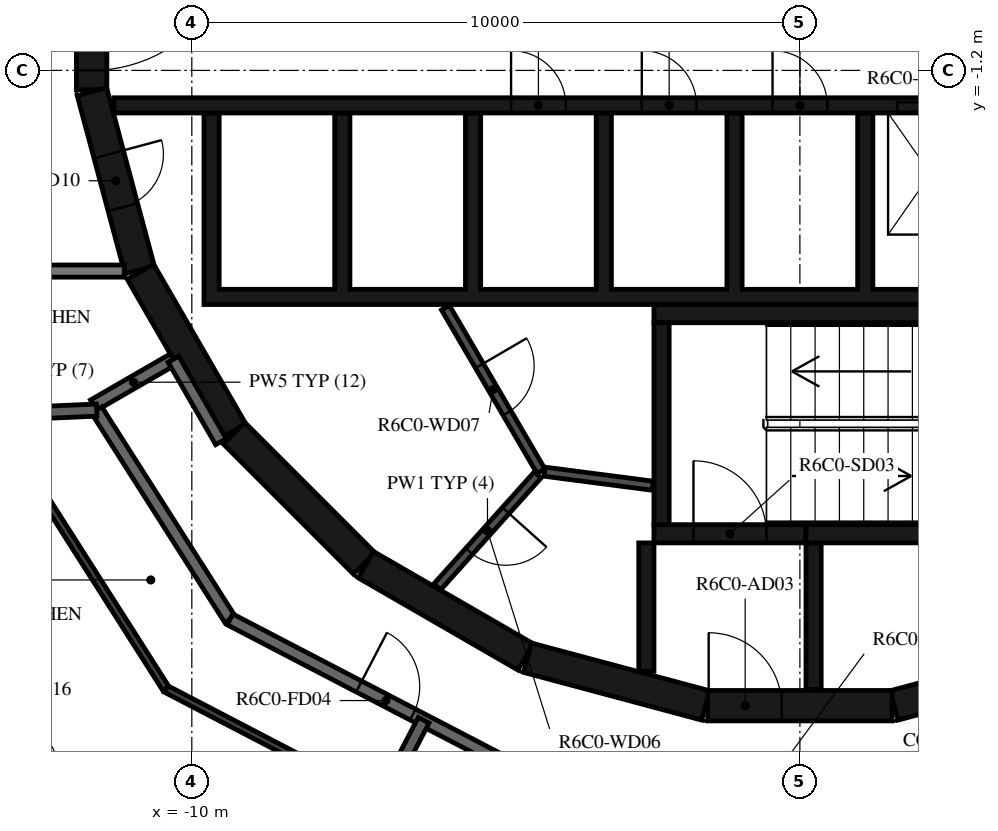
"""IFC4 building model, lengths in metres.
Left out: names, types, materials, properties, quantities, classifications, styles, units other than length and angle.
Written with IfcOpenShell. Run it as: python <this file> out.ifc"""

import sys

from ifc_helpers import new_model, si_unit, direction, frame, frame_2d, origin, place, context, subcontext, project, spatial, polyline, rectangle, outline, extrude, element, fill, save


model = new_model("IFC4")
c1 = context("Model", 3, precision=1e-05, world=origin(), true_north=direction((0.0, 1.0)))
c2 = subcontext(c1, "Body", "Model", "MODEL_VIEW")
j1 = project(units=[si_unit("LENGTHUNIT", "METRE"), si_unit("PLANEANGLEUNIT", "RADIAN")], contexts=[c1])
p1 = place(None, origin())
s1 = spatial("IfcSite", under=j1, at=p1, CompositionType="ELEMENT")
p2 = place(p1, origin())
s2 = spatial("IfcBuilding", under=s1, at=p2, CompositionType="ELEMENT")
p3 = place(p2, frame((0.0, 0.0, 247.7)))
s3 = spatial("IfcBuildingStorey", under=s2, at=p3, CompositionType="ELEMENT", Elevation=247.7)
p4 = place(p3, frame((1.55, -11.643, 0.0), z_axis=(0.0, 0.0, 1.0), x_axis=(0.965948410781, 0.258734743916, 0.0)))
e1 = element("IfcWall", 1, at=p4, inside=s3, PredefinedType="SHEAR", context=c2, shape_type="SweptSolid", body=[
    extrude(rectangle(XDim=3.033, YDim=0.5, at=frame_2d((1.516, 0.0))), origin(), (0.0, 0.0, 1.0), 3.12),
])
p5 = place(p3, frame((-11.647, 1.516, 0.0), z_axis=(0.0, 0.0, 1.0), x_axis=(0.0, -1.0, 0.0)))
e2 = element("IfcWall", 2, at=p5, inside=s3, PredefinedType="SHEAR", context=c2, shape_type="SweptSolid", body=[
    extrude(rectangle(XDim=3.033, YDim=0.5, at=frame_2d((1.516, 0.0))), origin(), (0.0, 0.0, 1.0), 3.12),
])
p6 = place(p5, frame((0.316, 0.0, 0.0)))
e3 = element("IfcOpeningElement", 3, at=p6, cuts=e2, PredefinedType="OPENING", context=c2, shape_type="SweptSolid", body=[
    extrude(rectangle(XDim=2.4, YDim=2.1, at=frame_2d((1.2, 1.05))), frame((0.0, 0.26, 0.0), z_axis=(0.0, -1.0, 0.0), x_axis=(1.0, 0.0, 0.0)), (0.0, 0.0, 1.0), 0.52),
])
p7 = place(p3, frame((-11.643, -1.55, 0.0), z_axis=(0.0, 0.0, 1.0), x_axis=(0.258734743916, -0.965948410781, 0.0)))
e4 = element("IfcWall", 4, at=p7, inside=s3, PredefinedType="SHEAR", context=c2, shape_type="SweptSolid", body=[
    extrude(rectangle(XDim=3.033, YDim=0.5, at=frame_2d((1.516, 0.0))), origin(), (0.0, 0.0, 1.0), 3.12),
])
p8 = place(p7, frame((1.066, 0.0, 0.0)))
e5 = element("IfcOpeningElement", 5, at=p8, cuts=e4, PredefinedType="OPENING", context=c2, shape_type="SweptSolid", body=[
    extrude(rectangle(XDim=0.9, YDim=2.1, at=frame_2d((0.45, 1.05))), frame((0.0, 0.26, 0.0), z_axis=(0.0, -1.0, 0.0), x_axis=(1.0, 0.0, 0.0)), (0.0, 0.0, 1.0), 0.52),
])
p9 = place(p3, frame((-10.845, -4.51, 0.0), z_axis=(0.0, 0.0, 1.0), x_axis=(0.500087131594, -0.865975092491, 0.0)))
e6 = element("IfcWall", 6, at=p9, inside=s3, PredefinedType="SHEAR", context=c2, shape_type="SweptSolid", body=[
    extrude(rectangle(XDim=3.033, YDim=0.5, at=frame_2d((1.516, 0.0))), origin(), (0.0, 0.0, 1.0), 3.12),
])
p10 = place(p3, frame((-9.308, -7.164, 0.0), z_axis=(0.0, 0.0, 1.0), x_axis=(0.707106781187, -0.707106781187, 0.0)))
e7 = element("IfcWall", 7, at=p10, inside=s3, PredefinedType="SHEAR", context=c2, shape_type="SweptSolid", body=[
    extrude(rectangle(XDim=3.032, YDim=0.5, at=frame_2d((1.516, 0.0))), origin(), (0.0, 0.0, 1.0), 3.12),
])
for number, where, z_axis, x_axis in (
    (8, (-7.137, -9.329, 0.0), (0.0, 0.0, 1.0), (0.866, -0.5, 0.0)),
    (9, (-4.479, -10.858, 0.0), (0.0, 0.0, 1.0), (0.966, -0.259, 0.0)),
):
    element("IfcWall", number, at=place(p3, frame(where, z_axis=z_axis, x_axis=x_axis)), inside=s3, PredefinedType="SHEAR", context=c2, shape_type="SweptSolid", body=[
        extrude(rectangle(XDim=3.033, YDim=0.5, at=frame_2d((1.516, 0.0))), origin(), (0.0, 0.0, 1.0), 3.12),
    ])
p11 = place(p3, frame((-1.516, -11.647, 0.0), z_axis=(0.0, 0.0, 1.0), x_axis=(1.0, 0.0, 0.0)))
e10 = element("IfcWall", 10, at=p11, inside=s3, PredefinedType="SHEAR", context=c2, shape_type="SweptSolid", body=[
    extrude(rectangle(XDim=3.033, YDim=0.5, at=frame_2d((1.516, 0.0))), origin(), (0.0, 0.0, 1.0), 3.12),
])
p12 = place(p11, frame((0.016, 0.0, 0.0)))
e11 = element("IfcOpeningElement", 11, at=p12, cuts=e10, PredefinedType="OPENING", context=c2, shape_type="SweptSolid", body=[
    extrude(rectangle(XDim=1.2, YDim=2.1, at=frame_2d((0.6, 1.05))), frame((0.0, 0.26, 0.0), z_axis=(0.0, -1.0, 0.0), x_axis=(1.0, 0.0, 0.0)), (0.0, 0.0, 1.0), 0.52),
])
p13 = place(p3, frame((-2.275, -8.67, 0.0), z_axis=(0.0, 0.0, 1.0), x_axis=(0.0, 1.0, 0.0)))
e12 = element("IfcWall", 12, at=p13, inside=s3, PredefinedType="SHEAR", context=c2, shape_type="SweptSolid", body=[
    extrude(rectangle(XDim=3.32, YDim=0.25, at=frame_2d((1.66, 0.0))), origin(), (0.0, 0.0, 1.0), 3.12),
])
p14 = place(p3, frame((-2.4, -5.2, 0.0), z_axis=(0.0, 0.0, 1.0), x_axis=(1.0, 0.0, 0.0)))
e13 = element("IfcWall", 13, at=p14, inside=s3, PredefinedType="SHEAR", context=c2, shape_type="SweptSolid", body=[
    extrude(rectangle(XDim=7.05, YDim=0.3, at=frame_2d((3.525, 0.0))), origin(), (0.0, 0.0, 1.0), 3.12),
])
p15 = place(p3, frame((0.1, -8.82, 0.0), z_axis=(0.0, 0.0, 1.0), x_axis=(1.0, 0.0, 0.0)))
e14 = element("IfcWall", 14, at=p15, inside=s3, PredefinedType="SHEAR", context=c2, shape_type="SweptSolid", body=[
    extrude(rectangle(XDim=4.55, YDim=0.3, at=frame_2d((2.275, 0.0))), origin(), (0.0, 0.0, 1.0), 3.12),
])
p16 = place(p3, frame((-2.4, -8.82, 0.0), z_axis=(0.0, 0.0, 1.0), x_axis=(1.0, 0.0, 0.0)))
e15 = element("IfcWall", 15, at=p16, inside=s3, PredefinedType="SHEAR", context=c2, shape_type="SweptSolid", body=[
    extrude(rectangle(XDim=2.5, YDim=0.3, at=frame_2d((1.25, 0.0))), origin(), (0.0, 0.0, 1.0), 3.12),
])
p17 = place(p16, frame((0.65, 0.0, 0.0)))
e16 = element("IfcOpeningElement", 16, at=p17, cuts=e15, PredefinedType="OPENING", context=c2, shape_type="SweptSolid", body=[
    extrude(rectangle(XDim=1.2, YDim=2.1, at=frame_2d((0.6, 1.05))), frame((0.0, 0.16, 0.0), z_axis=(0.0, -1.0, 0.0), x_axis=(1.0, 0.0, 0.0)), (0.0, 0.0, 1.0), 0.32),
])
p18 = place(p3, frame((-2.525, -8.97, 0.0), z_axis=(0.0, 0.0, 1.0), x_axis=(0.0, -1.0, 0.0)))
e17 = element("IfcWall", 17, at=p18, inside=s3, PredefinedType="SHEAR", context=c2, shape_type="SweptSolid", body=[
    extrude(rectangle(XDim=2.11, YDim=0.25, at=frame_2d((1.055, 0.0))), origin(), (0.0, 0.0, 1.0), 3.12),
])
p19 = place(p3, frame((0.225, -8.97, 0.0), z_axis=(0.0, 0.0, 1.0), x_axis=(0.0, -1.0, 0.0)))
e18 = element("IfcWall", 18, at=p19, inside=s3, PredefinedType="SHEAR", context=c2, shape_type="SweptSolid", body=[
    extrude(rectangle(XDim=2.41, YDim=0.25, at=frame_2d((1.205, 0.0))), origin(), (0.0, 0.0, 1.0), 3.12),
])
p20 = place(p3, origin())
e19 = element("IfcWall", 19, at=p20, inside=s3, PredefinedType="SHEAR", context=c2, shape_type="SweptSolid", body=[
    extrude(outline(polyline([(9.8, -5.05), (9.8, -4.8), (9.8, -1.9), (9.55, -1.9), (9.55, -4.8), (7.65, -4.8), (7.65, -1.9), (7.4, -1.9), (7.4, -4.8), (5.5, -4.8), (5.5, -1.9), (5.25, -1.9), (5.25, -4.8), (3.35, -4.8), (3.35, -1.9), (3.1, -1.9), (3.1, -4.8), (1.2, -4.8), (1.2, -1.9), (0.95, -1.9), (0.95, -4.8), (-0.95, -4.8), (-0.95, -1.9), (-1.2, -1.9), (-1.2, -4.8), (-3.1, -4.8), (-3.1, -1.9), (-3.35, -1.9), (-3.35, -4.8), (-5.25, -4.8), (-5.25, -1.9), (-5.5, -1.9), (-5.5, -4.8), (-7.4, -4.8), (-7.4, -1.9), (-7.65, -1.9), (-7.65, -4.8), (-9.55, -4.8), (-9.55, -1.9), (-9.8, -1.9), (-9.8, -4.8), (-9.8, -5.05), (9.8, -5.05)])), origin(), (0.0, 0.0, 1.0), 3.12),
])
p21 = place(p3, frame((-11.28, -1.775, 0.0), z_axis=(0.0, 0.0, 1.0), x_axis=(1.0, 0.0, 0.0)))
e20 = element("IfcWall", 20, at=p21, inside=s3, PredefinedType="SHEAR", context=c2, shape_type="SweptSolid", body=[
    extrude(rectangle(XDim=14.38, YDim=0.25, at=frame_2d((7.19, 0.0))), origin(), (0.0, 0.0, 1.0), 3.12),
])
p22 = place(p21, frame((12.88, 0.0, 0.0)))
e21 = element("IfcOpeningElement", 21, at=p22, cuts=e20, PredefinedType="OPENING", context=c2, shape_type="SweptSolid", body=[
    extrude(rectangle(XDim=1.1, YDim=2.1, at=frame_2d((0.55, 1.05))), frame((0.0, 0.135, 0.0), z_axis=(0.0, -1.0, 0.0), x_axis=(1.0, 0.0, 0.0)), (0.0, 0.0, 1.0), 0.27),
])
p23 = place(p21, frame((6.53, 0.0, 0.0)))
e22 = element("IfcOpeningElement", 22, at=p23, cuts=e20, PredefinedType="OPENING", context=c2, shape_type="SweptSolid", body=[
    extrude(rectangle(XDim=0.9, YDim=2.1, at=frame_2d((0.45, 1.05))), frame((0.0, 0.135, 0.0), z_axis=(0.0, -1.0, 0.0), x_axis=(1.0, 0.0, 0.0)), (0.0, 0.0, 1.0), 0.27),
])
p24 = place(p21, frame((8.68, 0.0, 0.0)))
e23 = element("IfcOpeningElement", 23, at=p24, cuts=e20, PredefinedType="OPENING", context=c2, shape_type="SweptSolid", body=[
    extrude(rectangle(XDim=0.9, YDim=2.1, at=frame_2d((0.45, 1.05))), frame((0.0, 0.135, 0.0), z_axis=(0.0, -1.0, 0.0), x_axis=(1.0, 0.0, 0.0)), (0.0, 0.0, 1.0), 0.27),
])
p25 = place(p21, frame((10.83, 0.0, 0.0)))
e24 = element("IfcOpeningElement", 24, at=p25, cuts=e20, PredefinedType="OPENING", context=c2, shape_type="SweptSolid", body=[
    extrude(rectangle(XDim=0.9, YDim=2.1, at=frame_2d((0.45, 1.05))), frame((0.0, 0.135, 0.0), z_axis=(0.0, -1.0, 0.0), x_axis=(1.0, 0.0, 0.0)), (0.0, 0.0, 1.0), 0.27),
])
p26 = place(p3, frame((-5.829, -5.102, 0.0), z_axis=(0.0, 0.0, 1.0), x_axis=(0.504480008384, -0.863423373057, 0.0)))
e25 = element("IfcWall", 25, at=p26, inside=s3, PredefinedType="PARTITIONING", context=c2, shape_type="SweptSolid", body=[
    extrude(rectangle(XDim=3.115, YDim=0.15, at=frame_2d((1.558, 0.0))), origin(), (0.0, 0.0, 1.0), 3.12),
])
p27 = place(p26, frame((1.107, 0.0, 0.0)))
e26 = element("IfcOpeningElement", 26, at=p27, cuts=e25, PredefinedType="OPENING", context=c2, shape_type="SweptSolid", body=[
    extrude(rectangle(XDim=0.9, YDim=2.1, at=frame_2d((0.45, 1.05))), frame((0.0, 0.085, 0.0), z_axis=(0.0, -1.0, 0.0), x_axis=(1.0, 0.0, 0.0)), (0.0, 0.0, 1.0), 0.17),
])
p28 = place(p3, frame((-4.311, -7.851, 0.0), z_axis=(0.0, 0.0, 1.0), x_axis=(-0.667869133096, -0.744278725383, 0.0)))
e27 = element("IfcWall", 27, at=p28, inside=s3, PredefinedType="PARTITIONING", context=c2, shape_type="SweptSolid", body=[
    extrude(rectangle(XDim=2.476, YDim=0.15, at=frame_2d((1.238, 0.0))), origin(), (0.0, 0.0, 1.0), 3.12),
])
p29 = place(p28, frame((0.788, 0.0, 0.0)))
e28 = element("IfcOpeningElement", 28, at=p29, cuts=e27, PredefinedType="OPENING", context=c2, shape_type="SweptSolid", body=[
    extrude(rectangle(XDim=0.9, YDim=2.1, at=frame_2d((0.45, 1.05))), frame((0.0, 0.085, 0.0), z_axis=(0.0, -1.0, 0.0), x_axis=(1.0, 0.0, 0.0)), (0.0, 0.0, 1.0), 0.17),
])
p30 = place(p3, frame((-4.198, -7.799, 0.0), z_axis=(0.0, 0.0, 1.0), x_axis=(0.991686747293, -0.128675542523, 0.0)))
e29 = element("IfcWall", 29, at=p30, inside=s3, PredefinedType="PARTITIONING", context=c2, shape_type="SweptSolid", body=[
    extrude(rectangle(XDim=1.793, YDim=0.15, at=frame_2d((0.896, 0.0))), origin(), (0.0, 0.0, 1.0), 3.12),
])
p31 = place(p3, frame((-10.303, -5.949, 0.0), z_axis=(0.0, 0.0, 1.0), x_axis=(-0.866043382451, -0.499968858743, 0.0)))
e30 = element("IfcWall", 30, at=p31, inside=s3, PredefinedType="STANDARD", context=c2, shape_type="SweptSolid", body=[
    extrude(rectangle(XDim=1.515, YDim=0.2, at=frame_2d((0.758, 0.0))), origin(), (0.0, 0.0, 1.0), 3.12),
])
p32 = place(p3, frame((-9.52, -7.305, 0.0), z_axis=(0.0, 0.0, 1.0), x_axis=(-0.500028278809, 0.866009076391, 0.0)))
e31 = element("IfcWall", 31, at=p32, inside=s3, PredefinedType="STANDARD", context=c2, shape_type="SweptSolid", body=[
    extrude(rectangle(XDim=1.566, YDim=0.2, at=frame_2d((0.783, 0.0))), origin(), (0.0, 0.0, 1.0), 3.12),
])
p33 = place(p3, frame((-11.565, -6.786, 0.0), z_axis=(0.0, 0.0, 1.0), x_axis=(0.537297327359, -0.843392898958, 0.0)))
e32 = element("IfcWall", 32, at=p33, inside=s3, PredefinedType="STANDARD", context=c2, shape_type="SweptSolid", body=[
    extrude(rectangle(XDim=4.081, YDim=0.2, at=frame_2d((2.041, 0.0))), origin(), (0.0, 0.0, 1.0), 3.12),
])
p34 = place(p3, frame((-9.372, -10.228, 0.0), z_axis=(0.0, 0.0, 1.0), x_axis=(0.887005184532, -0.461759464021, 0.0)))
e33 = element("IfcWall", 33, at=p34, inside=s3, PredefinedType="STANDARD", context=c2, shape_type="SweptSolid", body=[
    extrude(rectangle(XDim=7.181, YDim=0.2, at=frame_2d((3.591, 0.0))), origin(), (0.0, 0.0, 1.0), 3.12),
])
p35 = place(p34, frame((2.391, 0.0, 0.0)))
e34 = element("IfcOpeningElement", 34, at=p35, cuts=e33, PredefinedType="OPENING", context=c2, shape_type="SweptSolid", body=[
    extrude(rectangle(XDim=1.0, YDim=2.1, at=frame_2d((0.5, 1.05))), frame((0.0, 0.11, 0.0), z_axis=(0.0, -1.0, 0.0), x_axis=(1.0, 0.0, 0.0)), (0.0, 0.0, 1.0), 0.22),
])
p36 = place(p3, frame((-17.655, -4.5, 0.0), z_axis=(0.0, 0.0, 1.0), x_axis=(1.0, 0.0, 0.0)))
e35 = element("IfcWall", 35, at=p36, inside=s3, PredefinedType="STANDARD", context=c2, shape_type="SweptSolid", body=[
    extrude(rectangle(XDim=6.543, YDim=0.2, at=frame_2d((3.272, 0.0))), origin(), (0.0, 0.0, 1.0), 3.12),
])
p37 = place(p3, frame((-13.414, -6.867, 0.0), z_axis=(0.0, 0.0, 1.0), x_axis=(0.999046427216, 0.043660465726, 0.0)))
e36 = element("IfcWall", 36, at=p37, inside=s3, PredefinedType="STANDARD", context=c2, shape_type="SweptSolid", body=[
    extrude(rectangle(XDim=1.851, YDim=0.2, at=frame_2d((0.925, 0.0))), origin(), (0.0, 0.0, 1.0), 3.12),
])
p38 = place(p3, frame((-7.541, -14.486, 0.0), z_axis=(0.0, 0.0, 1.0), x_axis=(0.461746051786, 0.88701216658, 0.0)))
e37 = element("IfcWall", 37, at=p38, inside=s3, PredefinedType="STANDARD", context=c2, shape_type="SweptSolid", body=[
    extrude(rectangle(XDim=2.931, YDim=0.2, at=frame_2d((1.466, 0.0))), origin(), (0.0, 0.0, 1.0), 3.12),
])
p39 = place(p3, frame((-12.402, -8.265, 0.0), z_axis=(0.0, 0.0, 1.0), x_axis=(0.537321213777, -0.843377681247, 0.0)))
e38 = element("IfcWall", 38, at=p39, inside=s3, PredefinedType="PARTITIONING", context=c2, shape_type="SweptSolid", body=[
    extrude(rectangle(XDim=3.685, YDim=0.12, at=frame_2d((1.843, 0.0))), origin(), (0.0, 0.0, 1.0), 3.12),
])
p40 = place(p3, frame((-10.421, -11.373, 0.0), z_axis=(0.0, 0.0, 1.0), x_axis=(0.887012970857, -0.461744506769, 0.0)))
e39 = element("IfcWall", 39, at=p40, inside=s3, PredefinedType="PARTITIONING", context=c2, shape_type="SweptSolid", body=[
    extrude(rectangle(XDim=7.985, YDim=0.12, at=frame_2d((3.992, 0.0))), origin(), (0.0, 0.0, 1.0), 3.12),
])
p41 = place(p40, frame((4.192, 0.0, 0.0)))
e40 = element("IfcOpeningElement", 40, at=p41, cuts=e39, PredefinedType="OPENING", context=c2, shape_type="SweptSolid", body=[
    extrude(rectangle(XDim=0.9, YDim=2.1, at=frame_2d((0.45, 1.05))), frame((0.0, 0.07, 0.0), z_axis=(0.0, -1.0, 0.0), x_axis=(1.0, 0.0, 0.0)), (0.0, 0.0, 1.0), 0.14),
])
p42 = place(p17, origin())
e41 = element("IfcDoor", 41, at=p42, inside=s3, OperationType="SINGLE_SWING_LEFT", PredefinedType="DOOR", context=c2, shape_type="SweptSolid", body=[
    extrude(rectangle(XDim=1.2, YDim=2.1, at=frame_2d((0.6, 1.05))), frame((0.0, 0.025, 0.0), z_axis=(0.0, -1.0, 0.0), x_axis=(1.0, 0.0, 0.0)), (0.0, 0.0, 1.0), 0.05),
])
fill(e16, e41)
p43 = place(p12, origin())
e42 = element("IfcDoor", 42, at=p43, inside=s3, OperationType="SINGLE_SWING_RIGHT", PredefinedType="DOOR", context=c2, shape_type="SweptSolid", body=[
    extrude(rectangle(XDim=1.2, YDim=2.1, at=frame_2d((0.6, 1.05))), frame((0.0, 0.025, 0.0), z_axis=(0.0, -1.0, 0.0), x_axis=(1.0, 0.0, 0.0)), (0.0, 0.0, 1.0), 0.05),
])
fill(e11, e42)
p44 = place(p6, origin())
e43 = element("IfcDoor", 43, at=p44, inside=s3, OperationType="DOUBLE_DOOR_SINGLE_SWING", PredefinedType="DOOR", context=c2, shape_type="SweptSolid", body=[
    extrude(rectangle(XDim=2.4, YDim=2.1, at=frame_2d((1.2, 1.05))), frame((0.0, 0.025, 0.0), z_axis=(0.0, -1.0, 0.0), x_axis=(1.0, 0.0, 0.0)), (0.0, 0.0, 1.0), 0.05),
])
fill(e3, e43)
p45 = place(p22, origin())
e44 = element("IfcDoor", 44, at=p45, inside=s3, OperationType="DOUBLE_DOOR_SLIDING", PredefinedType="DOOR", context=c2, shape_type="SweptSolid", body=[
    extrude(rectangle(XDim=1.1, YDim=2.1, at=frame_2d((0.55, 1.05))), frame((0.0, 0.025, 0.0), z_axis=(0.0, -1.0, 0.0), x_axis=(1.0, 0.0, 0.0)), (0.0, 0.0, 1.0), 0.05),
])
fill(e21, e44)
p46 = place(p23, origin())
e45 = element("IfcDoor", 45, at=p46, inside=s3, OperationType="SINGLE_SWING_LEFT", PredefinedType="DOOR", context=c2, shape_type="SweptSolid", body=[
    extrude(rectangle(XDim=0.9, YDim=2.1, at=frame_2d((0.45, 1.05))), frame((0.0, 0.025, 0.0), z_axis=(0.0, -1.0, 0.0), x_axis=(1.0, 0.0, 0.0)), (0.0, 0.0, 1.0), 0.05),
])
fill(e22, e45)
p47 = place(p24, origin())
e46 = element("IfcDoor", 46, at=p47, inside=s3, OperationType="SINGLE_SWING_RIGHT", PredefinedType="DOOR", context=c2, shape_type="SweptSolid", body=[
    extrude(rectangle(XDim=0.9, YDim=2.1, at=frame_2d((0.45, 1.05))), frame((0.0, 0.025, 0.0), z_axis=(0.0, -1.0, 0.0), x_axis=(1.0, 0.0, 0.0)), (0.0, 0.0, 1.0), 0.05),
])
fill(e23, e46)
p48 = place(p25, origin())
e47 = element("IfcDoor", 47, at=p48, inside=s3, OperationType="SINGLE_SWING_LEFT", PredefinedType="DOOR", context=c2, shape_type="SweptSolid", body=[
    extrude(rectangle(XDim=0.9, YDim=2.1, at=frame_2d((0.45, 1.05))), frame((0.0, 0.025, 0.0), z_axis=(0.0, -1.0, 0.0), x_axis=(1.0, 0.0, 0.0)), (0.0, 0.0, 1.0), 0.05),
])
fill(e24, e47)
p49 = place(p29, origin())
e48 = element("IfcDoor", 48, at=p49, inside=s3, OperationType="SINGLE_SWING_RIGHT", PredefinedType="DOOR", context=c2, shape_type="SweptSolid", body=[
    extrude(rectangle(XDim=0.9, YDim=2.1, at=frame_2d((0.45, 1.05))), frame((0.0, 0.025, 0.0), z_axis=(0.0, -1.0, 0.0), x_axis=(1.0, 0.0, 0.0)), (0.0, 0.0, 1.0), 0.05),
])
fill(e28, e48)
p50 = place(p27, origin())
e49 = element("IfcDoor", 49, at=p50, inside=s3, OperationType="SINGLE_SWING_LEFT", PredefinedType="DOOR", context=c2, shape_type="SweptSolid", body=[
    extrude(rectangle(XDim=0.9, YDim=2.1, at=frame_2d((0.45, 1.05))), frame((0.0, 0.025, 0.0), z_axis=(0.0, -1.0, 0.0), x_axis=(1.0, 0.0, 0.0)), (0.0, 0.0, 1.0), 0.05),
])
fill(e26, e49)
p51 = place(p8, origin())
e50 = element("IfcDoor", 50, at=p51, inside=s3, OperationType="SINGLE_SWING_RIGHT", PredefinedType="DOOR", context=c2, shape_type="SweptSolid", body=[
    extrude(rectangle(XDim=0.9, YDim=2.1, at=frame_2d((0.45, 1.05))), frame((0.0, 0.025, 0.0), z_axis=(0.0, -1.0, 0.0), x_axis=(1.0, 0.0, 0.0)), (0.0, 0.0, 1.0), 0.05),
])
fill(e5, e50)
p52 = place(p35, origin())
e51 = element("IfcDoor", 51, at=p52, inside=s3, OperationType="SINGLE_SWING_RIGHT", PredefinedType="DOOR", context=c2, shape_type="SweptSolid", body=[
    extrude(rectangle(XDim=1.0, YDim=2.1, at=frame_2d((0.5, 1.05))), frame((0.0, 0.025, 0.0), z_axis=(0.0, -1.0, 0.0), x_axis=(1.0, 0.0, 0.0)), (0.0, 0.0, 1.0), 0.05),
])
fill(e34, e51)
save(model, sys.argv[1])
